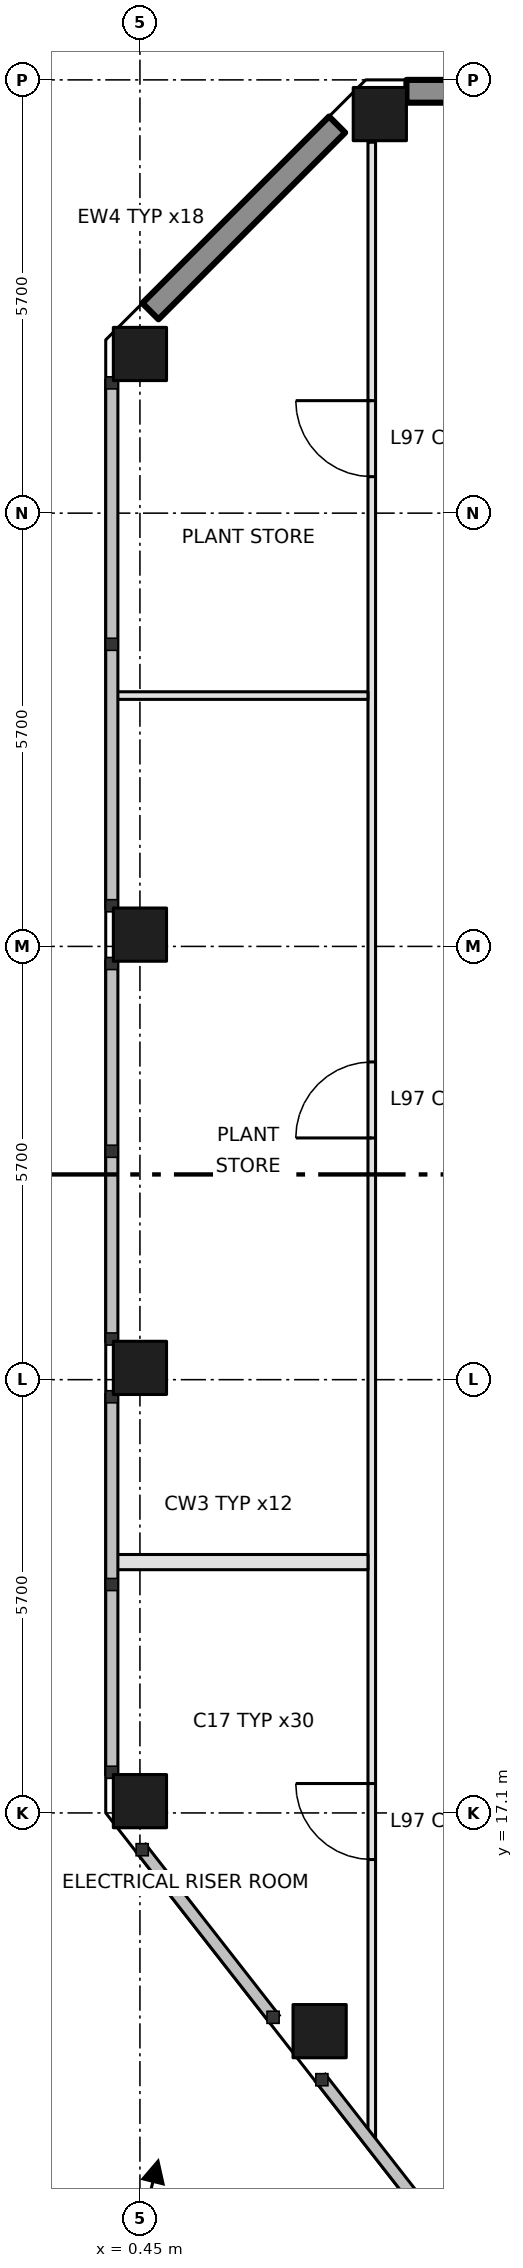
"""IFC4 building model, lengths in metres.
Left out: names, types, materials, properties, quantities, classifications, styles, units other than length and angle.
Written with IfcOpenShell. Run it as: python <this file> out.ifc"""

import sys

from ifc_helpers import new_model, si_unit, direction, frame, frame_2d, origin, origin_2d, place, context, subcontext, project, spatial, rectangle, extrude, element, fill, save


model = new_model("IFC4")
c1 = context("Model", 3, precision=1e-05, world=origin(), true_north=direction((0.0, 1.0)))
c2 = subcontext(c1, "Body", "Model", "MODEL_VIEW")
j1 = project(units=[si_unit("LENGTHUNIT", "METRE"), si_unit("PLANEANGLEUNIT", "RADIAN")], contexts=[c1])
p1 = place(None, origin())
s1 = spatial("IfcSite", under=j1, at=p1, CompositionType="ELEMENT")
p2 = place(p1, origin())
s2 = spatial("IfcBuilding", under=s1, at=p2, CompositionType="ELEMENT")
p3 = place(p2, frame((0.0, 0.0, 424.2)))
s3 = spatial("IfcBuildingStorey", under=s2, at=p3, CompositionType="ELEMENT", Elevation=424.2)
for number, where, z_axis, x_axis in (
    (1, (3.606, 39.45, 0.0), (0.0, 0.0, 1.0), (1.0, 0.0, 0.0)),
    (2, (0.45, 36.294, 0.0), (0.0, 0.0, 1.0), (1.0, 0.0, 0.0)),
    (3, (0.45, 17.255, 0.0), (0.0, 0.0, 1.0), (1.0, 0.0, 0.0)),
    (4, (0.45, 22.955, 0.0), (0.0, 0.0, 1.0), (1.0, 0.0, 0.0)),
    (5, (0.45, 28.655, 0.0), (0.0, 0.0, 1.0), (1.0, 0.0, 0.0)),
    (6, (2.814, 14.229, 0.0), (0.0, 0.0, 1.0), (1.0, 0.0, 0.0)),
):
    element("IfcColumn", number, at=place(p3, frame(where, z_axis=z_axis, x_axis=x_axis)), inside=s3, PredefinedType="COLUMN", context=c2, shape_type="SweptSolid", body=[
        extrude(rectangle(XDim=0.7, YDim=0.7, at=origin_2d()), origin(), (0.0, 0.0, 1.0), 4.8),
    ])
p4 = place(p3, frame((3.5, 12.753, 0.0), z_axis=(0.0, 0.0, 1.0), x_axis=(0.0, 1.0, 0.0)))
e7 = element("IfcWall", 7, at=p4, inside=s3, PredefinedType="PARTITIONING", context=c2, shape_type="SweptSolid", body=[
    extrude(rectangle(XDim=26.327, YDim=0.1, at=frame_2d((13.164, 0.0))), origin(), (0.0, 0.0, 1.0), 4.45),
])
p5 = place(p4, frame((3.734, 0.0, 0.0)))
e8 = element("IfcOpeningElement", 8, at=p5, cuts=e7, PredefinedType="OPENING", context=c2, shape_type="SweptSolid", body=[
    extrude(rectangle(XDim=1.0, YDim=2.1, at=frame_2d((0.5, 1.05))), frame((0.0, 0.06, 0.0), z_axis=(0.0, -1.0, 0.0), x_axis=(1.0, 0.0, 0.0)), (0.0, 0.0, 1.0), 0.12),
])
p6 = place(p4, frame((13.227, 0.0, 0.0)))
e9 = element("IfcOpeningElement", 9, at=p6, cuts=e7, PredefinedType="OPENING", context=c2, shape_type="SweptSolid", body=[
    extrude(rectangle(XDim=1.0, YDim=2.1, at=frame_2d((0.5, 1.05))), frame((0.0, 0.06, 0.0), z_axis=(0.0, -1.0, 0.0), x_axis=(1.0, 0.0, 0.0)), (0.0, 0.0, 1.0), 0.12),
])
p7 = place(p4, frame((21.927, 0.0, 0.0)))
e10 = element("IfcOpeningElement", 10, at=p7, cuts=e7, PredefinedType="OPENING", context=c2, shape_type="SweptSolid", body=[
    extrude(rectangle(XDim=1.0, YDim=2.1, at=frame_2d((0.5, 1.05))), frame((0.0, 0.06, 0.0), z_axis=(0.0, -1.0, 0.0), x_axis=(1.0, 0.0, 0.0)), (0.0, 0.0, 1.0), 0.12),
])
p8 = place(p3, frame((3.45, 20.4, 0.0), z_axis=(0.0, 0.0, 1.0), x_axis=(-1.0, 0.0, 0.0)))
e11 = element("IfcWall", 11, at=p8, inside=s3, PredefinedType="PARTITIONING", context=c2, shape_type="SweptSolid", body=[
    extrude(rectangle(XDim=3.376, YDim=0.2, at=frame_2d((1.688, 0.0))), origin(), (0.0, 0.0, 1.0), 4.45),
])
p9 = place(p3, frame((3.45, 31.8, 0.0), z_axis=(0.0, 0.0, 1.0), x_axis=(-1.0, 0.0, 0.0)))
e12 = element("IfcWall", 12, at=p9, inside=s3, PredefinedType="PARTITIONING", context=c2, shape_type="SweptSolid", body=[
    extrude(rectangle(XDim=3.376, YDim=0.1, at=frame_2d((1.688, 0.0))), origin(), (0.0, 0.0, 1.0), 4.45),
])
p10 = place(p3, frame((8.956, 39.75, 0.0), z_axis=(0.0, 0.0, 1.0), x_axis=(-1.0, 0.0, 0.0)))
e13 = element("IfcWall", 13, at=p10, inside=s3, PredefinedType="SOLIDWALL", context=c2, shape_type="SweptSolid", body=[
    extrude(rectangle(XDim=5.0, YDim=0.3, at=frame_2d((2.5, 0.0))), origin(), (0.0, 0.0, 1.0), 3.8),
])
p11 = place(p3, frame((3.044, 39.312, 0.0), z_axis=(0.0, 0.0, 1.0), x_axis=(-0.707106781187, -0.707106781187, 0.0)))
e14 = element("IfcWall", 14, at=p11, inside=s3, PredefinedType="SOLIDWALL", context=c2, shape_type="SweptSolid", body=[
    extrude(rectangle(XDim=3.473, YDim=0.3, at=frame_2d((1.737, 0.0))), origin(), (0.0, 0.0, 1.0), 3.8),
])
p12 = place(p5, origin())
e15 = element("IfcDoor", 15, at=p12, inside=s3, OperationType="SINGLE_SWING_RIGHT", PredefinedType="DOOR", context=c2, shape_type="SweptSolid", body=[
    extrude(rectangle(XDim=1.0, YDim=2.1, at=frame_2d((0.5, 1.05))), frame((0.0, 0.025, 0.0), z_axis=(0.0, -1.0, 0.0), x_axis=(1.0, 0.0, 0.0)), (0.0, 0.0, 1.0), 0.05),
])
fill(e8, e15)
p13 = place(p6, origin())
e16 = element("IfcDoor", 16, at=p13, inside=s3, OperationType="SINGLE_SWING_LEFT", PredefinedType="DOOR", context=c2, shape_type="SweptSolid", body=[
    extrude(rectangle(XDim=1.0, YDim=2.1, at=frame_2d((0.5, 1.05))), frame((0.0, 0.025, 0.0), z_axis=(0.0, -1.0, 0.0), x_axis=(1.0, 0.0, 0.0)), (0.0, 0.0, 1.0), 0.05),
])
fill(e9, e16)
p14 = place(p7, origin())
e17 = element("IfcDoor", 17, at=p14, inside=s3, OperationType="SINGLE_SWING_RIGHT", PredefinedType="DOOR", context=c2, shape_type="SweptSolid", body=[
    extrude(rectangle(XDim=1.0, YDim=2.1, at=frame_2d((0.5, 1.05))), frame((0.0, 0.025, 0.0), z_axis=(0.0, -1.0, 0.0), x_axis=(1.0, 0.0, 0.0)), (0.0, 0.0, 1.0), 0.05),
])
fill(e10, e17)
save(model, sys.argv[1])
